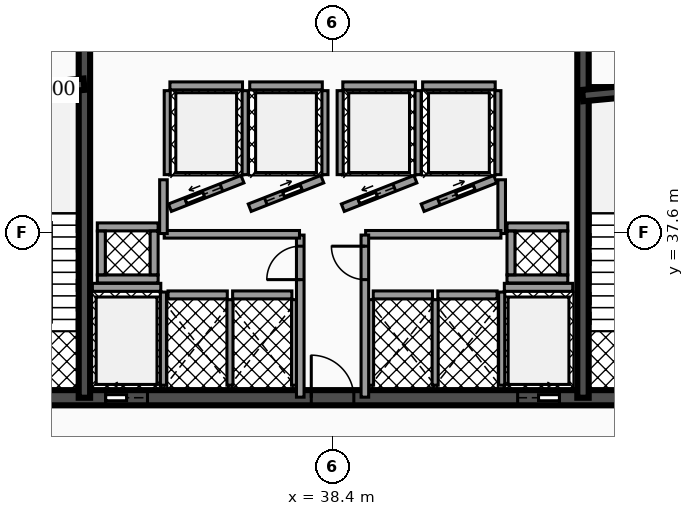
"""IFC4 building model, lengths in metres.
Left out: names, types, materials, properties, quantities, classifications, styles, units other than length and angle.
Written with IfcOpenShell. Run it as: python <this file> out.ifc"""

import sys

from ifc_helpers import new_model, si_unit, direction, frame, frame_2d, origin, place, context, subcontext, project, spatial, rectangle, extrude, element, fill, save


model = new_model("IFC4")
c1 = context("Model", 3, precision=1e-05, world=origin(), true_north=direction((0.0, 1.0)))
c2 = subcontext(c1, "Body", "Model", "MODEL_VIEW")
j1 = project(units=[si_unit("LENGTHUNIT", "METRE"), si_unit("PLANEANGLEUNIT", "RADIAN")], contexts=[c1])
p1 = place(None, origin())
s1 = spatial("IfcSite", under=j1, at=p1, CompositionType="ELEMENT")
p2 = place(p1, origin())
s2 = spatial("IfcBuilding", under=s1, at=p2, CompositionType="ELEMENT")
p3 = place(p2, frame((0.0, 0.0, 72.42)))
s3 = spatial("IfcBuildingStorey", under=s2, at=p3, CompositionType="ELEMENT", Elevation=72.42)
p4 = place(p3, frame((28.4, 33.25, 0.0), z_axis=(0.0, 0.0, 1.0), x_axis=(1.0, 0.0, 0.0)))
e1 = element("IfcWall", 1, at=p4, inside=s3, PredefinedType="SHEAR", context=c2, shape_type="SweptSolid", body=[
    extrude(rectangle(XDim=20.06, YDim=0.4, at=frame_2d((10.03, 0.0))), origin(), (0.0, 0.0, 1.0), 3.82),
])
p5 = place(p4, frame((4.03, 0.0, 0.0)))
e2 = element("IfcOpeningElement", 2, at=p5, cuts=e1, PredefinedType="OPENING", context=c2, shape_type="SweptSolid", body=[
    extrude(rectangle(XDim=1.1, YDim=2.15, at=frame_2d((0.55, 1.075))), frame((0.0, 0.21, 0.0), z_axis=(0.0, -1.0, 0.0), x_axis=(1.0, 0.0, 0.0)), (0.0, 0.0, 1.0), 0.42),
])
p6 = place(p4, frame((14.87, 0.0, 0.0)))
e3 = element("IfcOpeningElement", 3, at=p6, cuts=e1, PredefinedType="OPENING", context=c2, shape_type="SweptSolid", body=[
    extrude(rectangle(XDim=1.1, YDim=2.15, at=frame_2d((0.55, 1.075))), frame((0.0, 0.21, 0.0), z_axis=(0.0, -1.0, 0.0), x_axis=(1.0, 0.0, 0.0)), (0.0, 0.0, 1.0), 0.42),
])
p7 = place(p4, frame((1.31, 0.0, 0.0)))
e4 = element("IfcOpeningElement", 4, at=p7, cuts=e1, PredefinedType="OPENING", context=c2, shape_type="SweptSolid", body=[
    extrude(rectangle(XDim=1.1, YDim=2.2, at=frame_2d((0.55, 1.1))), frame((0.0, 0.21, 0.0), z_axis=(0.0, -1.0, 0.0), x_axis=(1.0, 0.0, 0.0)), (0.0, 0.0, 1.0), 0.42),
])
p8 = place(p4, frame((9.44, 0.0, 0.0)))
e5 = element("IfcOpeningElement", 5, at=p8, cuts=e1, PredefinedType="OPENING", context=c2, shape_type="SweptSolid", body=[
    extrude(rectangle(XDim=1.12, YDim=2.05, at=frame_2d((0.56, 1.025))), frame((0.0, 0.21, 0.0), z_axis=(0.0, -1.0, 0.0), x_axis=(1.0, 0.0, 0.0)), (0.0, 0.0, 1.0), 0.42),
])
p9 = place(p4, frame((17.65, 0.0, 0.0)))
e6 = element("IfcOpeningElement", 6, at=p9, cuts=e1, PredefinedType="OPENING", context=c2, shape_type="SweptSolid", body=[
    extrude(rectangle(XDim=1.1, YDim=2.2, at=frame_2d((0.55, 1.1))), frame((0.0, 0.21, 0.0), z_axis=(0.0, -1.0, 0.0), x_axis=(1.0, 0.0, 0.0)), (0.0, 0.0, 1.0), 0.42),
])
for number, where, z_axis, x_axis in (
    (7, (31.87, 33.25, 0.0), (0.0, 0.0, 1.0), (0.0, 1.0, 0.0)),
    (8, (44.99, 33.25, 0.0), (0.0, 0.0, 1.0), (0.0, 1.0, 0.0)),
):
    element("IfcWall", number, at=place(p3, frame(where, z_axis=z_axis, x_axis=x_axis)), inside=s3, PredefinedType="SHEAR", context=c2, shape_type="SweptSolid", body=[
        extrude(rectangle(XDim=10.2, YDim=0.3, at=frame_2d((5.1, 0.0))), origin(), (0.0, 0.0, 1.0), 3.82),
    ])
p10 = place(p3, frame((28.64, 41.2, 0.0), z_axis=(0.0, 0.0, 1.0), x_axis=(0.995687118776, 0.092774789157, 0.0)))
e9 = element("IfcWall", 9, at=p10, inside=s3, PredefinedType="SHEAR", context=c2, shape_type="SweptSolid", body=[
    extrude(rectangle(XDim=3.234, YDim=0.3, at=frame_2d((1.617, 0.0))), origin(), (0.0, 0.0, 1.0), 3.82),
])
p11 = place(p3, frame((44.98, 41.2, 0.0), z_axis=(0.0, 0.0, 1.0), x_axis=(0.995686468965, 0.09278176286, 0.0)))
e10 = element("IfcWall", 10, at=p11, inside=s3, PredefinedType="SHEAR", context=c2, shape_type="SweptSolid", body=[
    extrude(rectangle(XDim=3.234, YDim=0.3, at=frame_2d((1.617, 0.0))), origin(), (0.0, 0.0, 1.0), 3.82),
])
p12 = place(p3, frame((32.08, 36.155, 0.0), z_axis=(0.0, 0.0, 1.0), x_axis=(1.0, 0.0, 0.0)))
e11 = element("IfcWall", 11, at=p12, inside=s3, PredefinedType="SOLIDWALL", context=c2, shape_type="SweptSolid", body=[
    extrude(rectangle(XDim=1.8, YDim=0.21, at=frame_2d((0.9, 0.0))), origin(), (0.0, 0.0, 1.0), 2.792),
])
p13 = place(p3, frame((33.95, 33.58, 0.0), z_axis=(0.0, 0.0, 1.0), x_axis=(0.0, 1.0, 0.0)))
e12 = element("IfcWall", 12, at=p13, inside=s3, PredefinedType="SOLIDWALL", context=c2, shape_type="SweptSolid", body=[
    extrude(rectangle(XDim=2.45, YDim=0.16, at=frame_2d((1.225, 0.0))), origin(), (0.0, 0.0, 1.0), 2.792),
])
p14 = place(p3, frame((42.92, 36.155, 0.0), z_axis=(0.0, 0.0, 1.0), x_axis=(1.0, 0.0, 0.0)))
e13 = element("IfcWall", 13, at=p14, inside=s3, PredefinedType="SOLIDWALL", context=c2, shape_type="SweptSolid", body=[
    extrude(rectangle(XDim=1.8, YDim=0.21, at=frame_2d((0.9, 0.0))), origin(), (0.0, 0.0, 1.0), 2.792),
])
p15 = place(p3, frame((42.85, 33.58, 0.0), z_axis=(0.0, 0.0, 1.0), x_axis=(0.0, 1.0, 0.0)))
e14 = element("IfcWall", 14, at=p15, inside=s3, PredefinedType="SOLIDWALL", context=c2, shape_type="SweptSolid", body=[
    extrude(rectangle(XDim=2.45, YDim=0.16, at=frame_2d((1.225, 0.0))), origin(), (0.0, 0.0, 1.0), 2.792),
])
p16 = place(p3, frame((34.12, 38.25, 0.0), z_axis=(0.0, 0.0, 1.0), x_axis=(0.930804993012, 0.36551616241, 0.0)))
e15 = element("IfcWall", 15, at=p16, inside=s3, PredefinedType="SOLIDWALL", context=c2, shape_type="SweptSolid", body=[
    extrude(rectangle(XDim=2.052, YDim=0.21, at=frame_2d((1.026, 0.0))), origin(), (0.0, 0.0, 1.0), 2.792),
])
p17 = place(p16, frame((0.455, 0.0, 0.0)))
e16 = element("IfcOpeningElement", 16, at=p17, cuts=e15, PredefinedType="OPENING", context=c2, shape_type="SweptSolid", body=[
    extrude(rectangle(XDim=1.0, YDim=2.1, at=frame_2d((0.5, 1.05))), frame((0.0, 0.115, 0.0), z_axis=(0.0, -1.0, 0.0), x_axis=(1.0, 0.0, 0.0)), (0.0, 0.0, 1.0), 0.23),
])
p18 = place(p3, frame((34.12, 41.455, 0.0), z_axis=(0.0, 0.0, 1.0), x_axis=(1.0, 0.0, 0.0)))
e17 = element("IfcWall", 17, at=p18, inside=s3, PredefinedType="SOLIDWALL", context=c2, shape_type="SweptSolid", body=[
    extrude(rectangle(XDim=1.91, YDim=0.21, at=frame_2d((0.955, 0.0))), origin(), (0.0, 0.0, 1.0), 2.792),
])
for number, where, z_axis, x_axis in (
    (18, (34.05, 39.12, 0.0), (0.0, 0.0, 1.0), (0.0, 1.0, 0.0)),
    (19, (36.1, 39.12, 0.0), (0.0, 0.0, 1.0), (0.0, 1.0, 0.0)),
):
    element("IfcWall", number, at=place(p3, frame(where, z_axis=z_axis, x_axis=x_axis)), inside=s3, PredefinedType="SOLIDWALL", context=c2, shape_type="SweptSolid", body=[
        extrude(rectangle(XDim=2.21, YDim=0.16, at=frame_2d((1.105, 0.0))), origin(), (0.0, 0.0, 1.0), 2.792),
    ])
p19 = place(p3, frame((36.22, 38.25, 0.0), z_axis=(0.0, 0.0, 1.0), x_axis=(0.930804993012, 0.36551616241, 0.0)))
e20 = element("IfcWall", 20, at=p19, inside=s3, PredefinedType="SOLIDWALL", context=c2, shape_type="SweptSolid", body=[
    extrude(rectangle(XDim=2.052, YDim=0.21, at=frame_2d((1.026, 0.0))), origin(), (0.0, 0.0, 1.0), 2.792),
])
p20 = place(p19, frame((0.455, 0.0, 0.0)))
e21 = element("IfcOpeningElement", 21, at=p20, cuts=e20, PredefinedType="OPENING", context=c2, shape_type="SweptSolid", body=[
    extrude(rectangle(XDim=1.0, YDim=2.1, at=frame_2d((0.5, 1.05))), frame((0.0, 0.115, 0.0), z_axis=(0.0, -1.0, 0.0), x_axis=(1.0, 0.0, 0.0)), (0.0, 0.0, 1.0), 0.23),
])
p21 = place(p3, frame((36.22, 41.455, 0.0), z_axis=(0.0, 0.0, 1.0), x_axis=(1.0, 0.0, 0.0)))
e22 = element("IfcWall", 22, at=p21, inside=s3, PredefinedType="SOLIDWALL", context=c2, shape_type="SweptSolid", body=[
    extrude(rectangle(XDim=1.91, YDim=0.21, at=frame_2d((0.955, 0.0))), origin(), (0.0, 0.0, 1.0), 2.792),
])
p22 = place(p3, frame((38.2, 39.12, 0.0), z_axis=(0.0, 0.0, 1.0), x_axis=(0.0, 1.0, 0.0)))
e23 = element("IfcWall", 23, at=p22, inside=s3, PredefinedType="SOLIDWALL", context=c2, shape_type="SweptSolid", body=[
    extrude(rectangle(XDim=2.21, YDim=0.16, at=frame_2d((1.105, 0.0))), origin(), (0.0, 0.0, 1.0), 2.792),
])
p23 = place(p3, frame((38.67, 38.25, 0.0), z_axis=(0.0, 0.0, 1.0), x_axis=(0.930820886763, 0.3654756856, 0.0)))
e24 = element("IfcWall", 24, at=p23, inside=s3, PredefinedType="SOLIDWALL", context=c2, shape_type="SweptSolid", body=[
    extrude(rectangle(XDim=2.052, YDim=0.21, at=frame_2d((1.026, 0.0))), origin(), (0.0, 0.0, 1.0), 2.792),
])
p24 = place(p23, frame((0.455, 0.0, 0.0)))
e25 = element("IfcOpeningElement", 25, at=p24, cuts=e24, PredefinedType="OPENING", context=c2, shape_type="SweptSolid", body=[
    extrude(rectangle(XDim=1.0, YDim=2.1, at=frame_2d((0.5, 1.05))), frame((0.0, 0.115, 0.0), z_axis=(0.0, -1.0, 0.0), x_axis=(1.0, 0.0, 0.0)), (0.0, 0.0, 1.0), 0.23),
])
p25 = place(p3, frame((38.67, 41.455, 0.0), z_axis=(0.0, 0.0, 1.0), x_axis=(1.0, 0.0, 0.0)))
e26 = element("IfcWall", 26, at=p25, inside=s3, PredefinedType="SOLIDWALL", context=c2, shape_type="SweptSolid", body=[
    extrude(rectangle(XDim=1.91, YDim=0.21, at=frame_2d((0.955, 0.0))), origin(), (0.0, 0.0, 1.0), 2.792),
])
for number, where, z_axis, x_axis in (
    (27, (38.6, 39.12, 0.0), (0.0, 0.0, 1.0), (0.0, 1.0, 0.0)),
    (28, (40.65, 39.12, 0.0), (0.0, 0.0, 1.0), (0.0, 1.0, 0.0)),
):
    element("IfcWall", number, at=place(p3, frame(where, z_axis=z_axis, x_axis=x_axis)), inside=s3, PredefinedType="SOLIDWALL", context=c2, shape_type="SweptSolid", body=[
        extrude(rectangle(XDim=2.21, YDim=0.16, at=frame_2d((1.105, 0.0))), origin(), (0.0, 0.0, 1.0), 2.792),
    ])
p26 = place(p3, frame((40.77, 38.25, 0.0), z_axis=(0.0, 0.0, 1.0), x_axis=(0.930804993012, 0.36551616241, 0.0)))
e29 = element("IfcWall", 29, at=p26, inside=s3, PredefinedType="SOLIDWALL", context=c2, shape_type="SweptSolid", body=[
    extrude(rectangle(XDim=2.052, YDim=0.21, at=frame_2d((1.026, 0.0))), origin(), (0.0, 0.0, 1.0), 2.792),
])
p27 = place(p26, frame((0.455, 0.0, 0.0)))
e30 = element("IfcOpeningElement", 30, at=p27, cuts=e29, PredefinedType="OPENING", context=c2, shape_type="SweptSolid", body=[
    extrude(rectangle(XDim=1.0, YDim=2.1, at=frame_2d((0.5, 1.05))), frame((0.0, 0.115, 0.0), z_axis=(0.0, -1.0, 0.0), x_axis=(1.0, 0.0, 0.0)), (0.0, 0.0, 1.0), 0.23),
])
p28 = place(p3, frame((40.77, 41.455, 0.0), z_axis=(0.0, 0.0, 1.0), x_axis=(1.0, 0.0, 0.0)))
e31 = element("IfcWall", 31, at=p28, inside=s3, PredefinedType="SOLIDWALL", context=c2, shape_type="SweptSolid", body=[
    extrude(rectangle(XDim=1.91, YDim=0.21, at=frame_2d((0.955, 0.0))), origin(), (0.0, 0.0, 1.0), 2.792),
])
p29 = place(p3, frame((42.75, 39.12, 0.0), z_axis=(0.0, 0.0, 1.0), x_axis=(0.0, 1.0, 0.0)))
e32 = element("IfcWall", 32, at=p29, inside=s3, PredefinedType="SOLIDWALL", context=c2, shape_type="SweptSolid", body=[
    extrude(rectangle(XDim=2.21, YDim=0.16, at=frame_2d((1.105, 0.0))), origin(), (0.0, 0.0, 1.0), 2.792),
])
p30 = place(p3, frame((34.07, 35.955, 0.0), z_axis=(0.0, 0.0, 1.0), x_axis=(1.0, 0.0, 0.0)))
e33 = element("IfcWall", 33, at=p30, inside=s3, PredefinedType="SOLIDWALL", context=c2, shape_type="SweptSolid", body=[
    extrude(rectangle(XDim=1.56, YDim=0.21, at=frame_2d((0.78, 0.0))), origin(), (0.0, 0.0, 1.0), 2.792),
])
p31 = place(p3, frame((35.7, 33.58, 0.0), z_axis=(0.0, 0.0, 1.0), x_axis=(0.0, 1.0, 0.0)))
e34 = element("IfcWall", 34, at=p31, inside=s3, PredefinedType="SOLIDWALL", context=c2, shape_type="SweptSolid", body=[
    extrude(rectangle(XDim=2.25, YDim=0.16, at=frame_2d((1.125, 0.0))), origin(), (0.0, 0.0, 1.0), 2.792),
])
p32 = place(p3, frame((35.77, 35.955, 0.0), z_axis=(0.0, 0.0, 1.0), x_axis=(1.0, 0.0, 0.0)))
e35 = element("IfcWall", 35, at=p32, inside=s3, PredefinedType="SOLIDWALL", context=c2, shape_type="SweptSolid", body=[
    extrude(rectangle(XDim=1.56, YDim=0.21, at=frame_2d((0.78, 0.0))), origin(), (0.0, 0.0, 1.0), 2.792),
])
p33 = place(p3, frame((37.4, 33.58, 0.0), z_axis=(0.0, 0.0, 1.0), x_axis=(0.0, 1.0, 0.0)))
e36 = element("IfcWall", 36, at=p33, inside=s3, PredefinedType="SOLIDWALL", context=c2, shape_type="SweptSolid", body=[
    extrude(rectangle(XDim=2.25, YDim=0.16, at=frame_2d((1.125, 0.0))), origin(), (0.0, 0.0, 1.0), 2.792),
])
p34 = place(p3, frame((39.47, 35.955, 0.0), z_axis=(0.0, 0.0, 1.0), x_axis=(1.0, 0.0, 0.0)))
e37 = element("IfcWall", 37, at=p34, inside=s3, PredefinedType="SOLIDWALL", context=c2, shape_type="SweptSolid", body=[
    extrude(rectangle(XDim=1.56, YDim=0.21, at=frame_2d((0.78, 0.0))), origin(), (0.0, 0.0, 1.0), 2.792),
])
for number, where, z_axis, x_axis in (
    (38, (39.4, 33.58, 0.0), (0.0, 0.0, 1.0), (0.0, 1.0, 0.0)),
    (39, (41.1, 33.58, 0.0), (0.0, 0.0, 1.0), (0.0, 1.0, 0.0)),
):
    element("IfcWall", number, at=place(p3, frame(where, z_axis=z_axis, x_axis=x_axis)), inside=s3, PredefinedType="SOLIDWALL", context=c2, shape_type="SweptSolid", body=[
        extrude(rectangle(XDim=2.25, YDim=0.16, at=frame_2d((1.125, 0.0))), origin(), (0.0, 0.0, 1.0), 2.792),
    ])
p35 = place(p3, frame((41.17, 35.955, 0.0), z_axis=(0.0, 0.0, 1.0), x_axis=(1.0, 0.0, 0.0)))
e40 = element("IfcWall", 40, at=p35, inside=s3, PredefinedType="SOLIDWALL", context=c2, shape_type="SweptSolid", body=[
    extrude(rectangle(XDim=1.56, YDim=0.21, at=frame_2d((0.78, 0.0))), origin(), (0.0, 0.0, 1.0), 2.792),
])
for number, where, z_axis, x_axis in (
    (41, (32.21, 36.375, 0.0), (0.0, 0.0, 1.0), (1.0, 0.0, 0.0)),
    (42, (32.21, 37.745, 0.0), (0.0, 0.0, 1.0), (1.0, 0.0, 0.0)),
):
    element("IfcWall", number, at=place(p3, frame(where, z_axis=z_axis, x_axis=x_axis)), inside=s3, PredefinedType="SOLIDWALL", context=c2, shape_type="SweptSolid", body=[
        extrude(rectangle(XDim=1.6, YDim=0.21, at=frame_2d((0.8, 0.0))), origin(), (0.0, 0.0, 1.0), 3.82),
    ])
for number, where, z_axis, x_axis in (
    (43, (32.315, 36.485, 0.0), (0.0, 0.0, 1.0), (0.0, 1.0, 0.0)),
    (44, (33.705, 36.485, 0.0), (0.0, 0.0, 1.0), (0.0, 1.0, 0.0)),
):
    element("IfcWall", number, at=place(p3, frame(where, z_axis=z_axis, x_axis=x_axis)), inside=s3, PredefinedType="SOLIDWALL", context=c2, shape_type="SweptSolid", body=[
        extrude(rectangle(XDim=1.15, YDim=0.21, at=frame_2d((0.575, 0.0))), origin(), (0.0, 0.0, 1.0), 3.82),
    ])
for number, where, z_axis, x_axis in (
    (45, (42.99, 36.375, 0.0), (0.0, 0.0, 1.0), (1.0, 0.0, 0.0)),
    (46, (42.99, 37.745, 0.0), (0.0, 0.0, 1.0), (1.0, 0.0, 0.0)),
):
    element("IfcWall", number, at=place(p3, frame(where, z_axis=z_axis, x_axis=x_axis)), inside=s3, PredefinedType="SOLIDWALL", context=c2, shape_type="SweptSolid", body=[
        extrude(rectangle(XDim=1.6, YDim=0.21, at=frame_2d((0.8, 0.0))), origin(), (0.0, 0.0, 1.0), 3.82),
    ])
for number, where, z_axis, x_axis in (
    (47, (43.095, 36.485, 0.0), (0.0, 0.0, 1.0), (0.0, 1.0, 0.0)),
    (48, (44.485, 36.485, 0.0), (0.0, 0.0, 1.0), (0.0, 1.0, 0.0)),
):
    element("IfcWall", number, at=place(p3, frame(where, z_axis=z_axis, x_axis=x_axis)), inside=s3, PredefinedType="SOLIDWALL", context=c2, shape_type="SweptSolid", body=[
        extrude(rectangle(XDim=1.15, YDim=0.21, at=frame_2d((0.575, 0.0))), origin(), (0.0, 0.0, 1.0), 3.82),
    ])
p36 = place(p3, frame((37.55, 33.265, 0.0), z_axis=(0.0, 0.0, 1.0), x_axis=(0.0, 1.0, 0.0)))
e49 = element("IfcWall", 49, at=p36, inside=s3, PredefinedType="PARTITIONING", context=c2, shape_type="SweptSolid", body=[
    extrude(rectangle(XDim=4.265, YDim=0.2, at=frame_2d((2.133, 0.0))), origin(), (0.0, 0.0, 1.0), 2.777),
])
p37 = place(p36, frame((3.093, 0.0, 0.0)))
e50 = element("IfcOpeningElement", 50, at=p37, cuts=e49, PredefinedType="OPENING", context=c2, shape_type="SweptSolid", body=[
    extrude(rectangle(XDim=0.88, YDim=2.05, at=frame_2d((0.44, 1.025))), frame((0.0, 0.11, 0.0), z_axis=(0.0, -1.0, 0.0), x_axis=(1.0, 0.0, 0.0)), (0.0, 0.0, 1.0), 0.22),
])
p38 = place(p3, frame((33.97, 37.55, 0.0), z_axis=(0.0, 0.0, 1.0), x_axis=(1.0, 0.0, 0.0)))
e51 = element("IfcWall", 51, at=p38, inside=s3, PredefinedType="PARTITIONING", context=c2, shape_type="SweptSolid", body=[
    extrude(rectangle(XDim=3.56, YDim=0.2, at=frame_2d((1.78, 0.0))), origin(), (0.0, 0.0, 1.0), 2.777),
])
for number, where, z_axis, x_axis in (
    (52, (33.95, 37.57, 0.0), (0.0, 0.0, 1.0), (0.0, 1.0, 0.0)),
    (53, (42.85, 37.57, 0.0), (0.0, 0.0, 1.0), (0.0, 1.0, 0.0)),
):
    element("IfcWall", number, at=place(p3, frame(where, z_axis=z_axis, x_axis=x_axis)), inside=s3, PredefinedType="PARTITIONING", context=c2, shape_type="SweptSolid", body=[
        extrude(rectangle(XDim=1.415, YDim=0.2, at=frame_2d((0.708, 0.0))), origin(), (0.0, 0.0, 1.0), 2.777),
    ])
p39 = place(p3, frame((39.27, 37.55, 0.0), z_axis=(0.0, 0.0, 1.0), x_axis=(1.0, 0.0, 0.0)))
e54 = element("IfcWall", 54, at=p39, inside=s3, PredefinedType="PARTITIONING", context=c2, shape_type="SweptSolid", body=[
    extrude(rectangle(XDim=3.56, YDim=0.2, at=frame_2d((1.78, 0.0))), origin(), (0.0, 0.0, 1.0), 2.777),
])
p40 = place(p3, frame((39.25, 33.265, 0.0), z_axis=(0.0, 0.0, 1.0), x_axis=(0.0, 1.0, 0.0)))
e55 = element("IfcWall", 55, at=p40, inside=s3, PredefinedType="PARTITIONING", context=c2, shape_type="SweptSolid", body=[
    extrude(rectangle(XDim=4.265, YDim=0.2, at=frame_2d((2.133, 0.0))), origin(), (0.0, 0.0, 1.0), 2.777),
])
p41 = place(p40, frame((3.093, 0.0, 0.0)))
e56 = element("IfcOpeningElement", 56, at=p41, cuts=e55, PredefinedType="OPENING", context=c2, shape_type="SweptSolid", body=[
    extrude(rectangle(XDim=0.88, YDim=2.05, at=frame_2d((0.44, 1.025))), frame((0.0, 0.11, 0.0), z_axis=(0.0, -1.0, 0.0), x_axis=(1.0, 0.0, 0.0)), (0.0, 0.0, 1.0), 0.22),
])
p42 = place(p5, origin())
e57 = element("IfcDoor", 57, at=p42, inside=s3, OperationType="SLIDING_TO_LEFT", PredefinedType="DOOR", context=c2, shape_type="SweptSolid", body=[
    extrude(rectangle(XDim=1.1, YDim=2.15, at=frame_2d((0.55, 1.075))), frame((0.0, 0.025, 0.0), z_axis=(0.0, -1.0, 0.0), x_axis=(1.0, 0.0, 0.0)), (0.0, 0.0, 1.0), 0.05),
])
fill(e2, e57)
p43 = place(p6, origin())
e58 = element("IfcDoor", 58, at=p43, inside=s3, OperationType="SLIDING_TO_RIGHT", PredefinedType="DOOR", context=c2, shape_type="SweptSolid", body=[
    extrude(rectangle(XDim=1.1, YDim=2.15, at=frame_2d((0.55, 1.075))), frame((0.0, 0.025, 0.0), z_axis=(0.0, -1.0, 0.0), x_axis=(1.0, 0.0, 0.0)), (0.0, 0.0, 1.0), 0.05),
])
fill(e3, e58)
p44 = place(p17, origin())
e59 = element("IfcDoor", 59, at=p44, inside=s3, OperationType="SLIDING_TO_LEFT", PredefinedType="DOOR", context=c2, shape_type="SweptSolid", body=[
    extrude(rectangle(XDim=1.0, YDim=2.1, at=frame_2d((0.5, 1.05))), frame((0.0, 0.025, 0.0), z_axis=(0.0, -1.0, 0.0), x_axis=(1.0, 0.0, 0.0)), (0.0, 0.0, 1.0), 0.05),
])
fill(e16, e59)
p45 = place(p20, origin())
e60 = element("IfcDoor", 60, at=p45, inside=s3, OperationType="SLIDING_TO_RIGHT", PredefinedType="DOOR", context=c2, shape_type="SweptSolid", body=[
    extrude(rectangle(XDim=1.0, YDim=2.1, at=frame_2d((0.5, 1.05))), frame((0.0, 0.025, 0.0), z_axis=(0.0, -1.0, 0.0), x_axis=(1.0, 0.0, 0.0)), (0.0, 0.0, 1.0), 0.05),
])
fill(e21, e60)
p46 = place(p24, origin())
e61 = element("IfcDoor", 61, at=p46, inside=s3, OperationType="SLIDING_TO_LEFT", PredefinedType="DOOR", context=c2, shape_type="SweptSolid", body=[
    extrude(rectangle(XDim=1.0, YDim=2.1, at=frame_2d((0.5, 1.05))), frame((0.0, 0.025, 0.0), z_axis=(0.0, -1.0, 0.0), x_axis=(1.0, 0.0, 0.0)), (0.0, 0.0, 1.0), 0.05),
])
fill(e25, e61)
p47 = place(p27, origin())
e62 = element("IfcDoor", 62, at=p47, inside=s3, OperationType="SLIDING_TO_RIGHT", PredefinedType="DOOR", context=c2, shape_type="SweptSolid", body=[
    extrude(rectangle(XDim=1.0, YDim=2.1, at=frame_2d((0.5, 1.05))), frame((0.0, 0.025, 0.0), z_axis=(0.0, -1.0, 0.0), x_axis=(1.0, 0.0, 0.0)), (0.0, 0.0, 1.0), 0.05),
])
fill(e30, e62)
p48 = place(p8, origin())
e63 = element("IfcDoor", 63, at=p48, inside=s3, OperationType="SINGLE_SWING_LEFT", PredefinedType="DOOR", context=c2, shape_type="SweptSolid", body=[
    extrude(rectangle(XDim=1.12, YDim=2.05, at=frame_2d((0.56, 1.025))), frame((0.0, 0.025, 0.0), z_axis=(0.0, -1.0, 0.0), x_axis=(1.0, 0.0, 0.0)), (0.0, 0.0, 1.0), 0.05),
])
fill(e5, e63)
p49 = place(p37, origin())
e64 = element("IfcDoor", 64, at=p49, inside=s3, OperationType="SINGLE_SWING_LEFT", PredefinedType="DOOR", context=c2, shape_type="SweptSolid", body=[
    extrude(rectangle(XDim=0.88, YDim=2.05, at=frame_2d((0.44, 1.025))), frame((0.0, 0.025, 0.0), z_axis=(0.0, -1.0, 0.0), x_axis=(1.0, 0.0, 0.0)), (0.0, 0.0, 1.0), 0.05),
])
fill(e50, e64)
p50 = place(p41, origin())
e65 = element("IfcDoor", 65, at=p50, inside=s3, OperationType="SINGLE_SWING_RIGHT", PredefinedType="DOOR", context=c2, shape_type="SweptSolid", body=[
    extrude(rectangle(XDim=0.88, YDim=2.05, at=frame_2d((0.44, 1.025))), frame((0.0, 0.025, 0.0), z_axis=(0.0, -1.0, 0.0), x_axis=(1.0, 0.0, 0.0)), (0.0, 0.0, 1.0), 0.05),
])
fill(e56, e65)
save(model, sys.argv[1])
